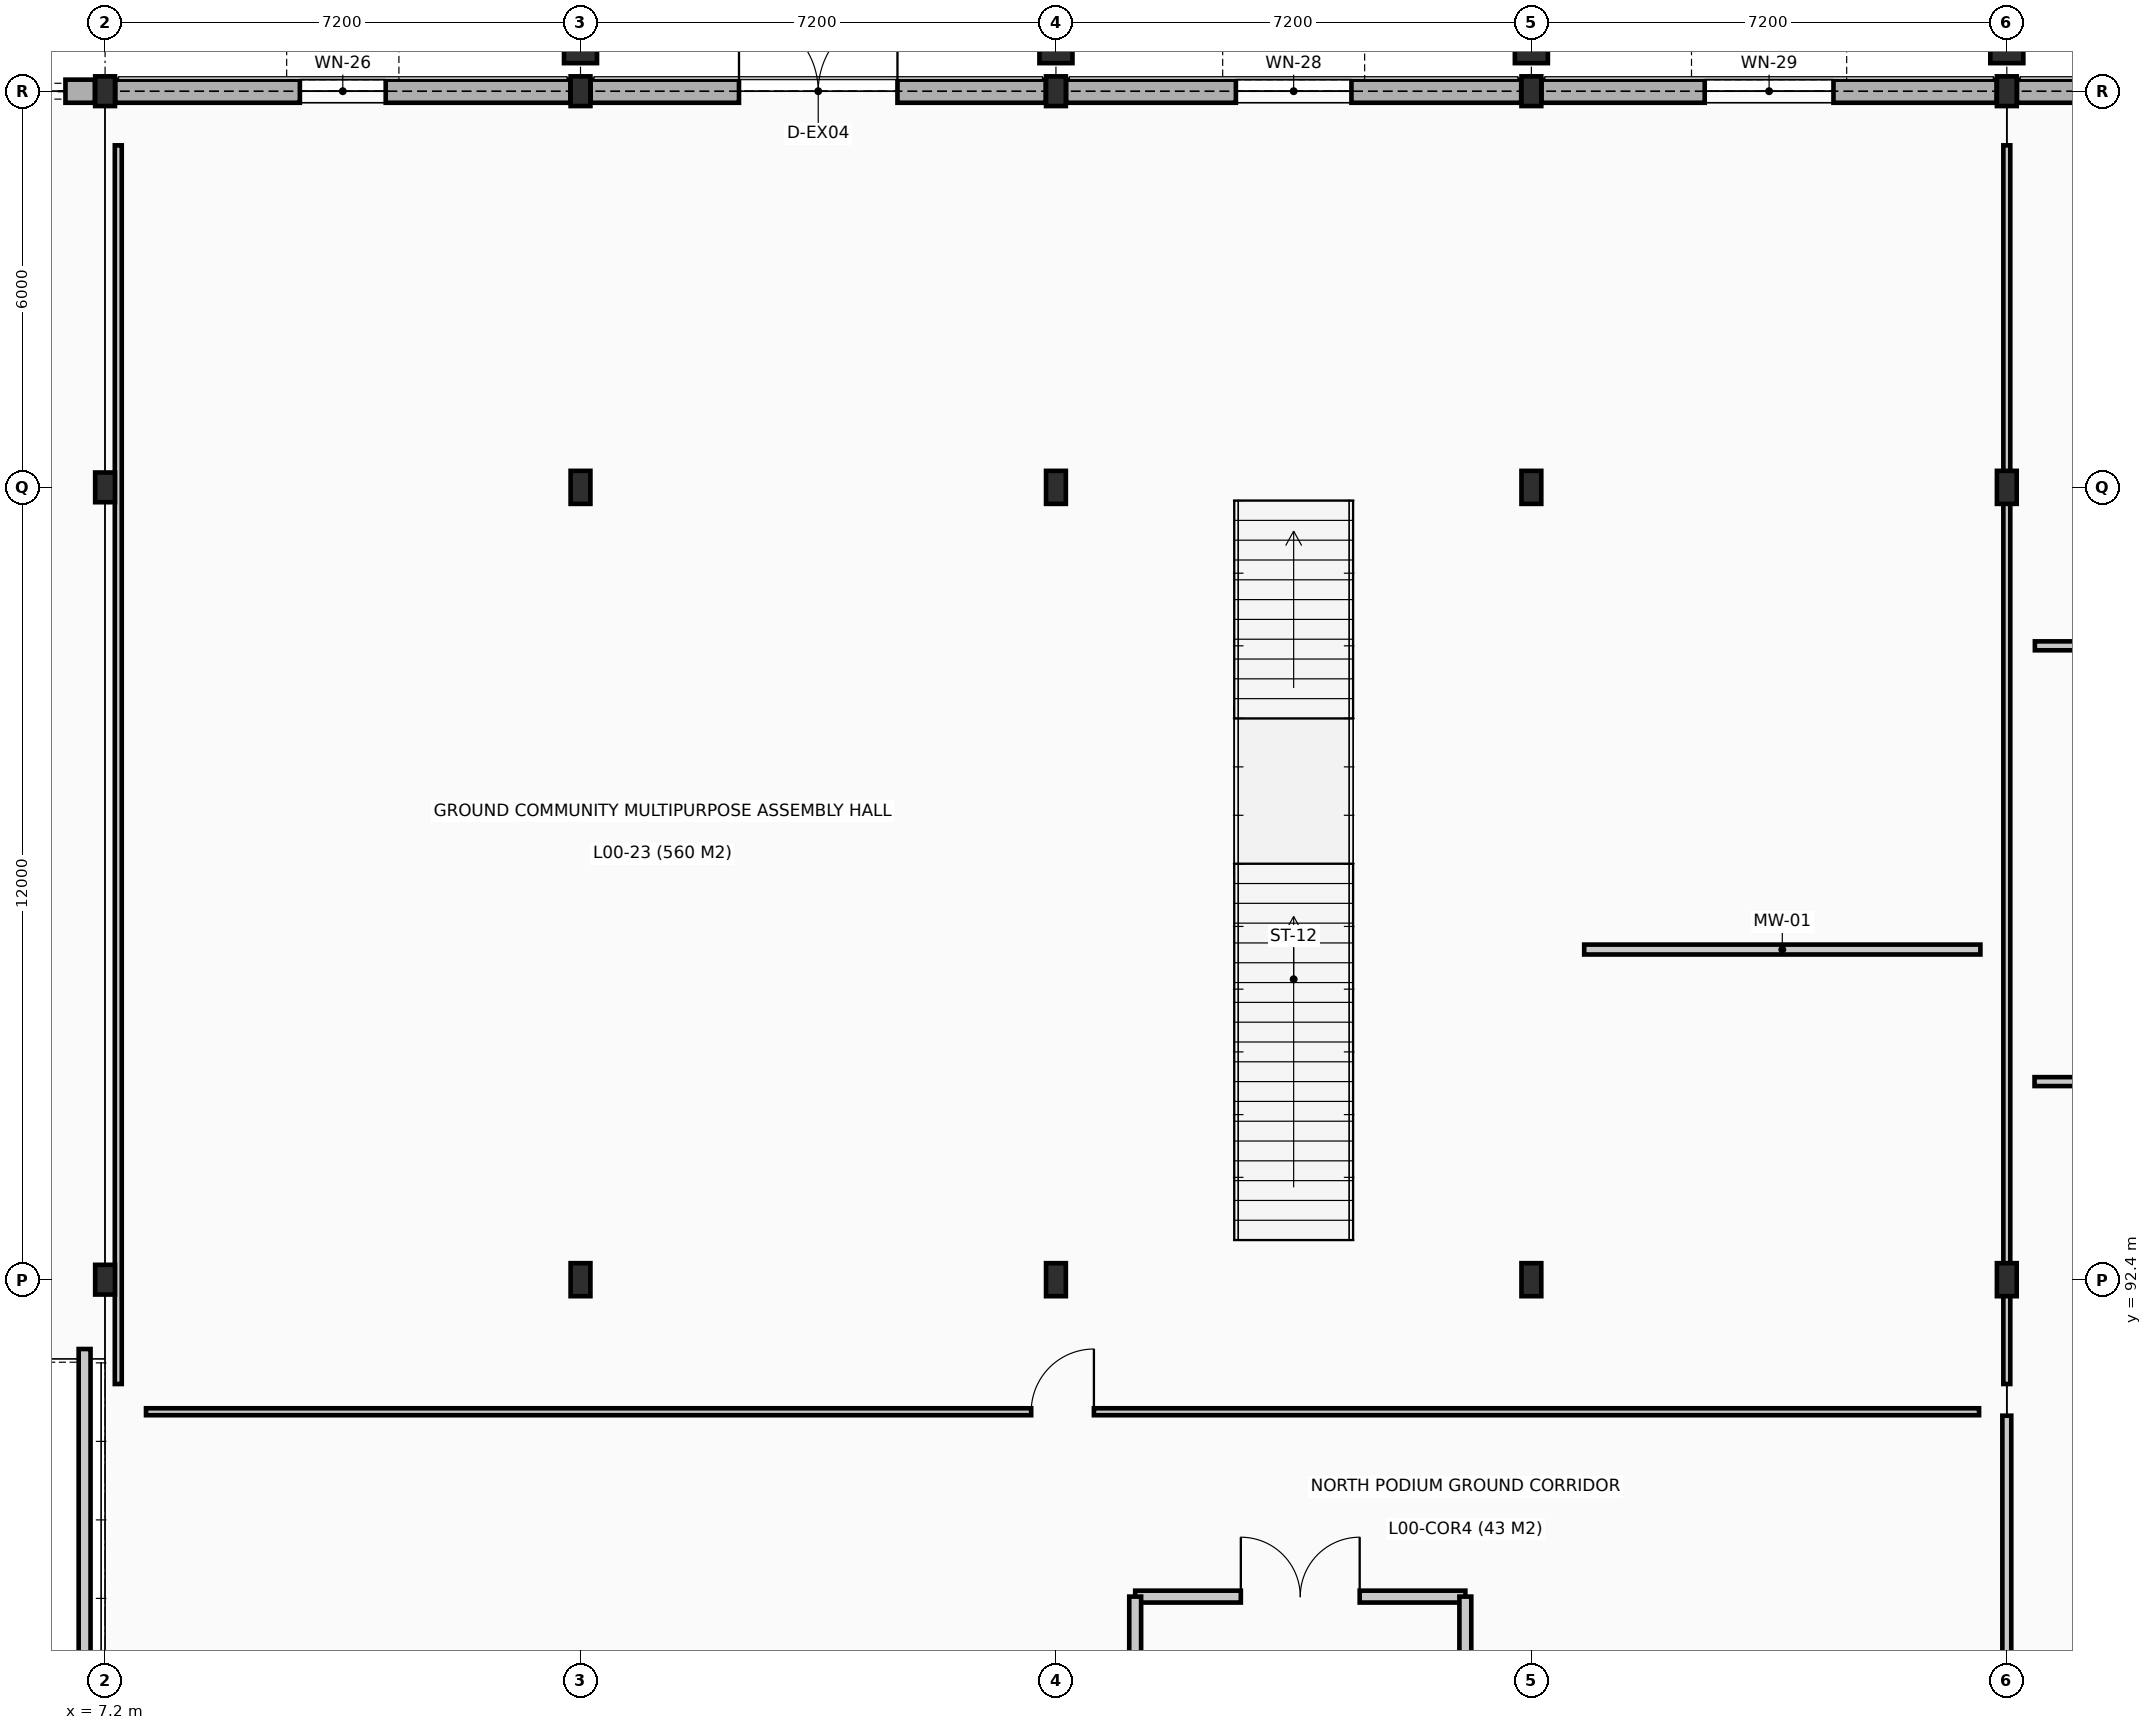
"""IFC4 building model, lengths in metres.
Left out: names, types, materials, properties, quantities, classifications, styles, units other than length and angle.
Written with IfcOpenShell. Run it as: python <this file> out.ifc"""

import sys

from ifc_helpers import new_model, si_unit, direction, frame, frame_2d, origin, origin_2d, place, context, subcontext, project, spatial, rectangle, i_section, extrude, element, fill, save


model = new_model("IFC4")
c1 = context("Model", 3, precision=1e-05, world=origin(), true_north=direction((0.0, 1.0)))
c2 = subcontext(c1, "Body", "Model", "MODEL_VIEW")
j1 = project(units=[si_unit("LENGTHUNIT", "METRE"), si_unit("PLANEANGLEUNIT", "RADIAN")], contexts=[c1])
p1 = place(None, origin())
s1 = spatial("IfcSite", under=j1, at=p1, CompositionType="ELEMENT")
p2 = place(p1, origin())
s2 = spatial("IfcBuilding", under=s1, at=p2, CompositionType="ELEMENT")
p3 = place(p2, origin())
s3 = spatial("IfcBuildingStorey", under=s2, at=p3, CompositionType="ELEMENT", Elevation=0.0)
for number, where, z_axis, x_axis in (
    (1, (7.2, 92.4, 0.0), (0.0, 0.0, 1.0), (1.0, 0.0, 0.0)),
    (2, (7.2, 104.4, 0.0), (0.0, 0.0, 1.0), (1.0, 0.0, 0.0)),
    (3, (7.2, 110.4, 0.0), (0.0, 0.0, 1.0), (1.0, 0.0, 0.0)),
):
    element("IfcColumn", number, at=place(p3, frame(where, z_axis=z_axis, x_axis=x_axis)), inside=s3, PredefinedType="COLUMN", context=c2, shape_type="SweptSolid", body=[
        extrude(i_section(OverallWidth=0.3, OverallDepth=0.45, WebThickness=0.014, FlangeThickness=0.026, at=origin_2d()), origin(), (0.0, 0.0, 1.0), 4.8),
    ])
for number, where, z_axis, x_axis in (
    (4, (14.4, 92.4, 0.0), (0.0, 0.0, 1.0), (1.0, 0.0, 0.0)),
    (5, (14.4, 104.4, 0.0), (0.0, 0.0, 1.0), (1.0, 0.0, 0.0)),
):
    element("IfcColumn", number, at=place(p3, frame(where, z_axis=z_axis, x_axis=x_axis)), inside=s3, PredefinedType="COLUMN", context=c2, shape_type="SweptSolid", body=[
        extrude(i_section(OverallWidth=0.3, OverallDepth=0.5, WebThickness=0.014, FlangeThickness=0.028, at=origin_2d()), origin(), (0.0, 0.0, 1.0), 4.8),
    ])
p4 = place(p3, frame((14.4, 110.4, 0.0), z_axis=(0.0, 0.0, 1.0), x_axis=(1.0, 0.0, 0.0)))
e6 = element("IfcColumn", 6, at=p4, inside=s3, PredefinedType="COLUMN", context=c2, shape_type="SweptSolid", body=[
    extrude(i_section(OverallWidth=0.3, OverallDepth=0.45, WebThickness=0.014, FlangeThickness=0.026, at=origin_2d()), origin(), (0.0, 0.0, 1.0), 4.8),
])
for number, where, z_axis, x_axis in (
    (7, (21.6, 92.4, 0.0), (0.0, 0.0, 1.0), (1.0, 0.0, 0.0)),
    (8, (21.6, 104.4, 0.0), (0.0, 0.0, 1.0), (1.0, 0.0, 0.0)),
):
    element("IfcColumn", number, at=place(p3, frame(where, z_axis=z_axis, x_axis=x_axis)), inside=s3, PredefinedType="COLUMN", context=c2, shape_type="SweptSolid", body=[
        extrude(i_section(OverallWidth=0.3, OverallDepth=0.5, WebThickness=0.014, FlangeThickness=0.028, at=origin_2d()), origin(), (0.0, 0.0, 1.0), 4.8),
    ])
p5 = place(p3, frame((21.6, 110.4, 0.0), z_axis=(0.0, 0.0, 1.0), x_axis=(1.0, 0.0, 0.0)))
e9 = element("IfcColumn", 9, at=p5, inside=s3, PredefinedType="COLUMN", context=c2, shape_type="SweptSolid", body=[
    extrude(i_section(OverallWidth=0.3, OverallDepth=0.45, WebThickness=0.014, FlangeThickness=0.026, at=origin_2d()), origin(), (0.0, 0.0, 1.0), 4.8),
])
for number, where, z_axis, x_axis in (
    (10, (28.8, 92.4, 0.0), (0.0, 0.0, 1.0), (1.0, 0.0, 0.0)),
    (11, (28.8, 104.4, 0.0), (0.0, 0.0, 1.0), (1.0, 0.0, 0.0)),
):
    element("IfcColumn", number, at=place(p3, frame(where, z_axis=z_axis, x_axis=x_axis)), inside=s3, PredefinedType="COLUMN", context=c2, shape_type="SweptSolid", body=[
        extrude(i_section(OverallWidth=0.3, OverallDepth=0.5, WebThickness=0.014, FlangeThickness=0.028, at=origin_2d()), origin(), (0.0, 0.0, 1.0), 4.8),
    ])
p6 = place(p3, frame((28.8, 110.4, 0.0), z_axis=(0.0, 0.0, 1.0), x_axis=(1.0, 0.0, 0.0)))
e12 = element("IfcColumn", 12, at=p6, inside=s3, PredefinedType="COLUMN", context=c2, shape_type="SweptSolid", body=[
    extrude(i_section(OverallWidth=0.3, OverallDepth=0.45, WebThickness=0.014, FlangeThickness=0.026, at=origin_2d()), origin(), (0.0, 0.0, 1.0), 4.8),
])
for number, where, z_axis, x_axis in (
    (13, (36.0, 92.4, 0.0), (0.0, 0.0, 1.0), (1.0, 0.0, 0.0)),
    (14, (36.0, 104.4, 0.0), (0.0, 0.0, 1.0), (1.0, 0.0, 0.0)),
):
    element("IfcColumn", number, at=place(p3, frame(where, z_axis=z_axis, x_axis=x_axis)), inside=s3, PredefinedType="COLUMN", context=c2, shape_type="SweptSolid", body=[
        extrude(i_section(OverallWidth=0.3, OverallDepth=0.5, WebThickness=0.014, FlangeThickness=0.028, at=origin_2d()), origin(), (0.0, 0.0, 1.0), 4.8),
    ])
p7 = place(p3, frame((36.0, 110.4, 0.0), z_axis=(0.0, 0.0, 1.0), x_axis=(1.0, 0.0, 0.0)))
e15 = element("IfcColumn", 15, at=p7, inside=s3, PredefinedType="COLUMN", context=c2, shape_type="SweptSolid", body=[
    extrude(i_section(OverallWidth=0.3, OverallDepth=0.45, WebThickness=0.014, FlangeThickness=0.026, at=origin_2d()), origin(), (0.0, 0.0, 1.0), 4.8),
])
for number, where, z_axis, x_axis in (
    (16, (14.4, 111.2, 0.0), (0.0, 0.0, 1.0), (1.0, 0.0, 0.0)),
    (17, (21.6, 111.2, 0.0), (0.0, 0.0, 1.0), (1.0, 0.0, 0.0)),
    (18, (28.8, 111.2, 0.0), (0.0, 0.0, 1.0), (1.0, 0.0, 0.0)),
    (19, (36.0, 111.2, 0.0), (0.0, 0.0, 1.0), (1.0, 0.0, 0.0)),
):
    element("IfcColumn", number, at=place(p3, frame(where, z_axis=z_axis, x_axis=x_axis)), inside=s3, PredefinedType="PILASTER", context=c2, shape_type="SweptSolid", body=[
        extrude(rectangle(XDim=0.5, YDim=0.75, at=origin_2d()), origin(), (0.0, 0.0, 1.0), 4.8),
    ])
p8 = place(p3, frame((0.154, 110.4, 0.0), z_axis=(0.0, 0.0, 1.0), x_axis=(1.0, 0.0, 0.0)))
e20 = element("IfcWall", 20, at=p8, inside=s3, PredefinedType="SOLIDWALL", context=c2, shape_type="SweptSolid", body=[
    extrude(rectangle(XDim=6.892, YDim=0.35, at=frame_2d((3.446, 0.0))), origin(), (0.0, 0.0, 1.0), 4.065),
])
p9 = place(p8, frame((0.446, 0.0, 0.0)))
e21 = element("IfcOpeningElement", 21, at=p9, cuts=e20, PredefinedType="OPENING", context=c2, shape_type="SweptSolid", body=[
    extrude(rectangle(XDim=6.0, YDim=3.4, at=frame_2d((3.0, 1.7))), frame((0.0, 0.185, 0.0), z_axis=(0.0, -1.0, 0.0), x_axis=(1.0, 0.0, 0.0)), (0.0, 0.0, 1.0), 0.37),
])
p10 = place(p3, frame((7.354, 110.4, 0.0), z_axis=(0.0, 0.0, 1.0), x_axis=(1.0, 0.0, 0.0)))
e22 = element("IfcWall", 22, at=p10, inside=s3, PredefinedType="SOLIDWALL", context=c2, shape_type="SweptSolid", body=[
    extrude(rectangle(XDim=6.892, YDim=0.35, at=frame_2d((3.446, 0.0))), origin(), (0.0, 0.0, 1.0), 4.065),
])
p11 = place(p10, frame((2.796, 0.0, 1.0)))
e23 = element("IfcOpeningElement", 23, at=p11, cuts=e22, PredefinedType="OPENING", context=c2, shape_type="SweptSolid", body=[
    extrude(rectangle(XDim=1.3, YDim=1.6, at=frame_2d((0.65, 0.8))), frame((0.0, 0.185, 0.0), z_axis=(0.0, -1.0, 0.0), x_axis=(1.0, 0.0, 0.0)), (0.0, 0.0, 1.0), 0.37),
])
p12 = place(p3, frame((14.554, 110.4, 0.0), z_axis=(0.0, 0.0, 1.0), x_axis=(1.0, 0.0, 0.0)))
e24 = element("IfcWall", 24, at=p12, inside=s3, PredefinedType="SOLIDWALL", context=c2, shape_type="SweptSolid", body=[
    extrude(rectangle(XDim=6.892, YDim=0.35, at=frame_2d((3.446, 0.0))), origin(), (0.0, 0.0, 1.0), 4.065),
])
p13 = place(p12, frame((2.246, 0.0, 0.0)))
e25 = element("IfcOpeningElement", 25, at=p13, cuts=e24, PredefinedType="OPENING", context=c2, shape_type="SweptSolid", body=[
    extrude(rectangle(XDim=2.4, YDim=2.4, at=frame_2d((1.2, 1.2))), frame((0.0, 0.185, 0.0), z_axis=(0.0, -1.0, 0.0), x_axis=(1.0, 0.0, 0.0)), (0.0, 0.0, 1.0), 0.37),
])
p14 = place(p3, frame((21.754, 110.4, 0.0), z_axis=(0.0, 0.0, 1.0), x_axis=(1.0, 0.0, 0.0)))
e26 = element("IfcWall", 26, at=p14, inside=s3, PredefinedType="SOLIDWALL", context=c2, shape_type="SweptSolid", body=[
    extrude(rectangle(XDim=6.892, YDim=0.35, at=frame_2d((3.446, 0.0))), origin(), (0.0, 0.0, 1.0), 4.165),
])
p15 = place(p14, frame((2.571, 0.0, 1.0)))
e27 = element("IfcOpeningElement", 27, at=p15, cuts=e26, PredefinedType="OPENING", context=c2, shape_type="SweptSolid", body=[
    extrude(rectangle(XDim=1.75, YDim=1.65, at=frame_2d((0.875, 0.825))), frame((0.0, 0.185, 0.0), z_axis=(0.0, -1.0, 0.0), x_axis=(1.0, 0.0, 0.0)), (0.0, 0.0, 1.0), 0.37),
])
p16 = place(p3, frame((28.954, 110.4, 0.0), z_axis=(0.0, 0.0, 1.0), x_axis=(1.0, 0.0, 0.0)))
e28 = element("IfcWall", 28, at=p16, inside=s3, PredefinedType="SOLIDWALL", context=c2, shape_type="SweptSolid", body=[
    extrude(rectangle(XDim=6.892, YDim=0.35, at=frame_2d((3.446, 0.0))), origin(), (0.0, 0.0, 1.0), 4.165),
])
p17 = place(p16, frame((2.471, 0.0, 1.0)))
e29 = element("IfcOpeningElement", 29, at=p17, cuts=e28, PredefinedType="OPENING", context=c2, shape_type="SweptSolid", body=[
    extrude(rectangle(XDim=1.95, YDim=1.95, at=frame_2d((0.975, 0.975))), frame((0.0, 0.185, 0.0), z_axis=(0.0, -1.0, 0.0), x_axis=(1.0, 0.0, 0.0)), (0.0, 0.0, 1.0), 0.37),
])
p18 = place(p3, frame((36.154, 110.4, 0.0), z_axis=(0.0, 0.0, 1.0), x_axis=(1.0, 0.0, 0.0)))
e30 = element("IfcWall", 30, at=p18, inside=s3, PredefinedType="SOLIDWALL", context=c2, shape_type="SweptSolid", body=[
    extrude(rectangle(XDim=6.892, YDim=0.35, at=frame_2d((3.446, 0.0))), origin(), (0.0, 0.0, 1.0), 4.065),
])
p19 = place(p18, frame((2.246, 0.0, 0.0)))
e31 = element("IfcOpeningElement", 31, at=p19, cuts=e30, PredefinedType="OPENING", context=c2, shape_type="SweptSolid", body=[
    extrude(rectangle(XDim=2.4, YDim=2.4, at=frame_2d((1.2, 1.2))), frame((0.0, 0.185, 0.0), z_axis=(0.0, -1.0, 0.0), x_axis=(1.0, 0.0, 0.0)), (0.0, 0.0, 1.0), 0.37),
])
p20 = place(p3, frame((22.8, 87.6, 0.0), z_axis=(0.0, 0.0, 1.0), x_axis=(1.0, 0.0, 0.0)))
e32 = element("IfcWall", 32, at=p20, inside=s3, PredefinedType="PARTITIONING", context=c2, shape_type="SweptSolid", body=[
    extrude(rectangle(XDim=5.0, YDim=0.18, at=frame_2d((2.5, 0.0))), origin(), (0.0, 0.0, 1.0), 4.26),
])
p21 = place(p20, frame((1.6, 0.0, 0.0)))
e33 = element("IfcOpeningElement", 33, at=p21, cuts=e32, PredefinedType="OPENING", context=c2, shape_type="SweptSolid", body=[
    extrude(rectangle(XDim=1.8, YDim=2.15, at=frame_2d((0.9, 1.075))), frame((0.0, 0.1, 0.0), z_axis=(0.0, -1.0, 0.0), x_axis=(1.0, 0.0, 0.0)), (0.0, 0.0, 1.0), 0.2),
])
for number, where, z_axis, x_axis in (
    (34, (22.8, 84.0, 0.0), (0.0, 0.0, 1.0), (0.0, 1.0, 0.0)),
    (35, (27.8, 84.0, 0.0), (0.0, 0.0, 1.0), (0.0, 1.0, 0.0)),
):
    element("IfcWall", number, at=place(p3, frame(where, z_axis=z_axis, x_axis=x_axis)), inside=s3, PredefinedType="PARTITIONING", context=c2, shape_type="SweptSolid", body=[
        extrude(rectangle(XDim=3.6, YDim=0.18, at=frame_2d((1.8, 0.0))), origin(), (0.0, 0.0, 1.0), 4.565),
    ])
p22 = place(p3, frame((6.89, 49.2, 0.0), z_axis=(0.0, 0.0, 1.0), x_axis=(0.0, 1.0, 0.0)))
e36 = element("IfcWall", 36, at=p22, inside=s3, PredefinedType="PARTITIONING", context=c2, shape_type="SweptSolid", body=[
    extrude(rectangle(XDim=42.15, YDim=0.18, at=frame_2d((21.075, 0.0))), origin(), (0.0, 0.0, 1.0), 4.565),
])
p23 = place(p3, frame((7.82, 90.4, 0.0), z_axis=(0.0, 0.0, 1.0), x_axis=(1.0, 0.0, 0.0)))
e37 = element("IfcWall", 37, at=p23, inside=s3, PredefinedType="PARTITIONING", context=c2, shape_type="SweptSolid", body=[
    extrude(rectangle(XDim=27.76, YDim=0.105, at=frame_2d((13.88, 0.0))), origin(), (0.0, 0.0, 1.0), 4.565),
])
p24 = place(p23, frame((13.405, 0.0, 0.0)))
e38 = element("IfcOpeningElement", 38, at=p24, cuts=e37, PredefinedType="OPENING", context=c2, shape_type="SweptSolid", body=[
    extrude(rectangle(XDim=0.95, YDim=2.1, at=frame_2d((0.475, 1.05))), frame((0.0, 0.062, 0.0), z_axis=(0.0, -1.0, 0.0), x_axis=(1.0, 0.0, 0.0)), (0.0, 0.0, 1.0), 0.125),
])
for number, where, z_axis, x_axis in (
    (39, (7.4, 90.82, 0.0), (0.0, 0.0, 1.0), (0.0, 1.0, 0.0)),
    (40, (36.0, 90.82, 0.0), (0.0, 0.0, 1.0), (0.0, 1.0, 0.0)),
):
    element("IfcWall", number, at=place(p3, frame(where, z_axis=z_axis, x_axis=x_axis)), inside=s3, PredefinedType="PARTITIONING", context=c2, shape_type="SweptSolid", body=[
        extrude(rectangle(XDim=18.76, YDim=0.105, at=frame_2d((9.38, 0.0))), origin(), (0.0, 0.0, 1.0), 3.91),
    ])
p25 = place(p3, frame((36.42, 95.4, 0.0), z_axis=(0.0, 0.0, 1.0), x_axis=(1.0, 0.0, 0.0)))
e41 = element("IfcWall", 41, at=p25, inside=s3, PredefinedType="PARTITIONING", context=c2, shape_type="SweptSolid", body=[
    extrude(rectangle(XDim=15.16, YDim=0.135, at=frame_2d((7.58, 0.0))), origin(), (0.0, 0.0, 1.0), 4.565),
])
p26 = place(p3, frame((36.0, 78.62, 0.0), z_axis=(0.0, 0.0, 1.0), x_axis=(0.0, 1.0, 0.0)))
e42 = element("IfcWall", 42, at=p26, inside=s3, PredefinedType="PARTITIONING", context=c2, shape_type="SweptSolid", body=[
    extrude(rectangle(XDim=11.72, YDim=0.135, at=frame_2d((5.86, 0.0))), origin(), (0.0, 0.0, 1.0), 4.11),
])
p27 = place(p3, frame((36.425, 102.0, 0.0), z_axis=(0.0, 0.0, 1.0), x_axis=(1.0, 0.0, 0.0)))
e43 = element("IfcWall", 43, at=p27, inside=s3, PredefinedType="PARTITIONING", context=c2, shape_type="SweptSolid", body=[
    extrude(rectangle(XDim=6.155, YDim=0.135, at=frame_2d((3.078, 0.0))), origin(), (0.0, 0.0, 1.0), 4.565),
])
p28 = place(p27, frame((2.575, 0.0, 0.0)))
e44 = element("IfcOpeningElement", 44, at=p28, cuts=e43, PredefinedType="OPENING", context=c2, shape_type="SweptSolid", body=[
    extrude(rectangle(XDim=1.0, YDim=2.1, at=frame_2d((0.5, 1.05))), frame((0.0, 0.077, 0.0), z_axis=(0.0, -1.0, 0.0), x_axis=(1.0, 0.0, 0.0)), (0.0, 0.0, 1.0), 0.155),
])
p29 = place(p3, frame((29.6, 97.4, 0.0), z_axis=(0.0, 0.0, 1.0), x_axis=(1.0, 0.0, 0.0)))
e45 = element("IfcWall", 45, at=p29, inside=s3, PredefinedType="MOVABLE", context=c2, shape_type="SweptSolid", body=[
    extrude(rectangle(XDim=6.0, YDim=0.15, at=frame_2d((3.0, 0.0))), origin(), (0.0, 0.0, 1.0), 4.285),
])
p30 = place(p9, origin())
e46 = element("IfcDoor", 46, at=p30, inside=s3, OperationType="ROLLINGUP", PredefinedType="GATE", context=c2, shape_type="SweptSolid", body=[
    extrude(rectangle(XDim=6.0, YDim=3.4, at=frame_2d((3.0, 1.7))), frame((0.0, 0.025, 0.0), z_axis=(0.0, -1.0, 0.0), x_axis=(1.0, 0.0, 0.0)), (0.0, 0.0, 1.0), 0.05),
])
fill(e21, e46)
p31 = place(p11, origin())
e47 = element("IfcWindow", 47, at=p31, inside=s3, PartitioningType="SINGLE_PANEL", PredefinedType="WINDOW", context=c2, shape_type="SweptSolid", body=[
    extrude(rectangle(XDim=1.3, YDim=1.6, at=frame_2d((0.65, 0.8))), frame((0.0, 0.03, 0.0), z_axis=(0.0, -1.0, 0.0), x_axis=(1.0, 0.0, 0.0)), (0.0, 0.0, 1.0), 0.06),
])
fill(e23, e47)
p32 = place(p13, origin())
e48 = element("IfcDoor", 48, at=p32, inside=s3, OperationType="DOUBLE_DOOR_SINGLE_SWING", PredefinedType="DOOR", context=c2, shape_type="SweptSolid", body=[
    extrude(rectangle(XDim=2.4, YDim=2.4, at=frame_2d((1.2, 1.2))), frame((0.0, 0.025, 0.0), z_axis=(0.0, -1.0, 0.0), x_axis=(1.0, 0.0, 0.0)), (0.0, 0.0, 1.0), 0.05),
])
fill(e25, e48)
p33 = place(p15, origin())
e49 = element("IfcWindow", 49, at=p33, inside=s3, PartitioningType="SINGLE_PANEL", PredefinedType="WINDOW", context=c2, shape_type="SweptSolid", body=[
    extrude(rectangle(XDim=1.75, YDim=1.65, at=frame_2d((0.875, 0.825))), frame((0.0, 0.03, 0.0), z_axis=(0.0, -1.0, 0.0), x_axis=(1.0, 0.0, 0.0)), (0.0, 0.0, 1.0), 0.06),
])
fill(e27, e49)
p34 = place(p17, origin())
e50 = element("IfcWindow", 50, at=p34, inside=s3, PartitioningType="SINGLE_PANEL", PredefinedType="WINDOW", context=c2, shape_type="SweptSolid", body=[
    extrude(rectangle(XDim=1.95, YDim=1.95, at=frame_2d((0.975, 0.975))), frame((0.0, 0.03, 0.0), z_axis=(0.0, -1.0, 0.0), x_axis=(1.0, 0.0, 0.0)), (0.0, 0.0, 1.0), 0.06),
])
fill(e29, e50)
p35 = place(p21, origin())
e51 = element("IfcDoor", 51, at=p35, inside=s3, OperationType="DOUBLE_DOOR_SINGLE_SWING", PredefinedType="DOOR", context=c2, shape_type="SweptSolid", body=[
    extrude(rectangle(XDim=1.8, YDim=2.15, at=frame_2d((0.9, 1.075))), frame((0.0, 0.025, 0.0), z_axis=(0.0, -1.0, 0.0), x_axis=(1.0, 0.0, 0.0)), (0.0, 0.0, 1.0), 0.05),
])
fill(e33, e51)
p36 = place(p24, origin())
e52 = element("IfcDoor", 52, at=p36, inside=s3, OperationType="SINGLE_SWING_RIGHT", PredefinedType="DOOR", context=c2, shape_type="SweptSolid", body=[
    extrude(rectangle(XDim=0.95, YDim=2.1, at=frame_2d((0.475, 1.05))), frame((0.0, 0.025, 0.0), z_axis=(0.0, -1.0, 0.0), x_axis=(1.0, 0.0, 0.0)), (0.0, 0.0, 1.0), 0.05),
])
fill(e38, e52)
save(model, sys.argv[1])
